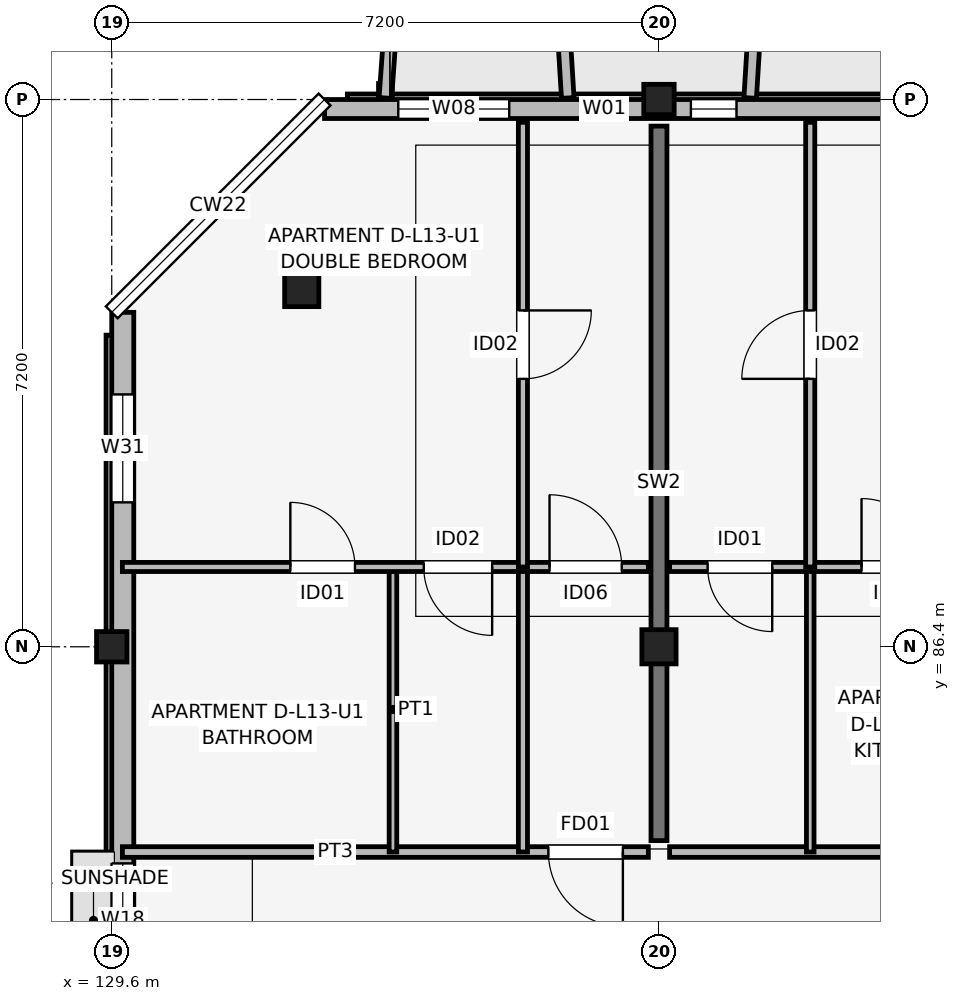
"""IFC4 building model, lengths in metres.
Left out: names, types, materials, properties, quantities, classifications, styles, units other than length and angle.
Written with IfcOpenShell. Run it as: python <this file> out.ifc"""

import sys

from ifc_helpers import new_model, si_unit, direction, frame, frame_2d, origin, origin_2d, place, context, subcontext, project, spatial, rectangle, extrude, element, fill, save


model = new_model("IFC4")
c1 = context("Model", 3, precision=1e-05, world=origin(), true_north=direction((0.0, 1.0)))
c2 = subcontext(c1, "Body", "Model", "MODEL_VIEW")
j1 = project(units=[si_unit("LENGTHUNIT", "METRE"), si_unit("PLANEANGLEUNIT", "RADIAN")], contexts=[c1])
p1 = place(None, origin())
s1 = spatial("IfcSite", under=j1, at=p1, CompositionType="ELEMENT")
p2 = place(p1, origin())
s2 = spatial("IfcBuilding", under=s1, at=p2, CompositionType="ELEMENT")
p3 = place(p2, frame((0.0, 0.0, 43.35)))
s3 = spatial("IfcBuildingStorey", under=s2, at=p3, CompositionType="ELEMENT", Elevation=43.35)
p4 = place(p3, frame((129.6, 86.4, 0.0), z_axis=(0.0, 0.0, 1.0), x_axis=(1.0, 0.0, 0.0)))
e1 = element("IfcColumn", 1, at=p4, inside=s3, PredefinedType="COLUMN", context=c2, shape_type="SweptSolid", body=[
    extrude(rectangle(XDim=0.4, YDim=0.4, at=origin_2d()), origin(), (0.0, 0.0, 1.0), 3.15),
])
for number, where, z_axis, x_axis in (
    (2, (132.1, 91.1, 0.0), (0.0, 0.0, 1.0), (1.0, 0.0, 0.0)),
    (3, (136.8, 86.4, 0.0), (0.0, 0.0, 1.0), (1.0, 0.0, 0.0)),
):
    element("IfcColumn", number, at=place(p3, frame(where, z_axis=z_axis, x_axis=x_axis)), inside=s3, PredefinedType="COLUMN", context=c2, shape_type="SweptSolid", body=[
        extrude(rectangle(XDim=0.45, YDim=0.45, at=origin_2d()), origin(), (0.0, 0.0, 1.0), 3.15),
    ])
p5 = place(p3, frame((136.8, 93.6, 0.0), z_axis=(0.0, 0.0, 1.0), x_axis=(1.0, 0.0, 0.0)))
e4 = element("IfcColumn", 4, at=p5, inside=s3, PredefinedType="COLUMN", context=c2, shape_type="SweptSolid", body=[
    extrude(rectangle(XDim=0.4, YDim=0.4, at=origin_2d()), origin(), (0.0, 0.0, 1.0), 3.15),
])
p6 = place(p3, frame((136.8, 83.85, 0.0), z_axis=(0.0, 0.0, 1.0), x_axis=(0.0, 1.0, 0.0)))
e5 = element("IfcWall", 5, at=p6, inside=s3, PredefinedType="SHEAR", context=c2, shape_type="SweptSolid", body=[
    extrude(rectangle(XDim=9.4, YDim=0.21, at=frame_2d((4.7, 0.0))), origin(), (0.0, 0.0, 1.0), 3.15),
])
p7 = place(p3, frame((162.8, 93.475, 0.0), z_axis=(0.0, 0.0, 1.0), x_axis=(-1.0, 0.0, 0.0)))
e6 = element("IfcWall", 6, at=p7, inside=s3, PredefinedType="SOLIDWALL", context=c2, shape_type="SweptSolid", body=[
    extrude(rectangle(XDim=30.4, YDim=0.25, at=frame_2d((15.2, 0.0))), origin(), (0.0, 0.0, 1.0), 2.45),
])
p8 = place(p7, frame((21.95, 0.0, 0.0), z_axis=(0.0, 0.0, 1.0), x_axis=(-1.0, 0.0, 0.0)))
e7 = element("IfcOpeningElement", 7, at=p8, cuts=e6, PredefinedType="OPENING", context=c2, shape_type="SweptSolid", body=[
    extrude(rectangle(XDim=1.5, YDim=2.15, at=frame_2d((0.75, 1.075))), frame((0.0, 0.135, 0.0), z_axis=(0.0, -1.0, 0.0), x_axis=(1.0, 0.0, 0.0)), (0.0, 0.0, 1.0), 0.27),
])
p9 = place(p7, frame((7.7, 0.0, 0.0), z_axis=(0.0, 0.0, 1.0), x_axis=(-1.0, 0.0, 0.0)))
e8 = element("IfcOpeningElement", 8, at=p9, cuts=e6, PredefinedType="OPENING", context=c2, shape_type="SweptSolid", body=[
    extrude(rectangle(XDim=1.8, YDim=2.15, at=frame_2d((0.9, 1.075))), frame((0.0, 0.135, 0.0), z_axis=(0.0, -1.0, 0.0), x_axis=(1.0, 0.0, 0.0)), (0.0, 0.0, 1.0), 0.27),
])
p10 = place(p7, frame((27.97, 0.0, 0.7)))
e9 = element("IfcOpeningElement", 9, at=p10, cuts=e6, PredefinedType="OPENING", context=c2, shape_type="SweptSolid", body=[
    extrude(rectangle(XDim=1.46, YDim=1.55, at=frame_2d((0.73, 0.775))), frame((0.0, 0.135, 0.0), z_axis=(0.0, -1.0, 0.0), x_axis=(1.0, 0.0, 0.0)), (0.0, 0.0, 1.0), 0.27),
])
p11 = place(p7, frame((26.42, 0.0, 0.75)))
e10 = element("IfcOpeningElement", 10, at=p11, cuts=e6, PredefinedType="OPENING", context=c2, shape_type="SweptSolid", body=[
    extrude(rectangle(XDim=0.6, YDim=1.25, at=frame_2d((0.3, 0.625))), frame((0.0, 0.135, 0.0), z_axis=(0.0, -1.0, 0.0), x_axis=(1.0, 0.0, 0.0)), (0.0, 0.0, 1.0), 0.27),
])
p12 = place(p7, frame((24.98, 0.0, 0.75)))
e11 = element("IfcOpeningElement", 11, at=p12, cuts=e6, PredefinedType="OPENING", context=c2, shape_type="SweptSolid", body=[
    extrude(rectangle(XDim=0.6, YDim=1.25, at=frame_2d((0.3, 0.625))), frame((0.0, 0.135, 0.0), z_axis=(0.0, -1.0, 0.0), x_axis=(1.0, 0.0, 0.0)), (0.0, 0.0, 1.0), 0.27),
])
p13 = place(p7, frame((16.725, 0.0, 0.75)))
e12 = element("IfcOpeningElement", 12, at=p13, cuts=e6, PredefinedType="OPENING", context=c2, shape_type="SweptSolid", body=[
    extrude(rectangle(XDim=0.72, YDim=1.35, at=frame_2d((0.36, 0.675))), frame((0.0, 0.135, 0.0), z_axis=(0.0, -1.0, 0.0), x_axis=(1.0, 0.0, 0.0)), (0.0, 0.0, 1.0), 0.27),
])
p14 = place(p7, frame((12.925, 0.0, 0.69)))
e13 = element("IfcOpeningElement", 13, at=p14, cuts=e6, PredefinedType="OPENING", context=c2, shape_type="SweptSolid", body=[
    extrude(rectangle(XDim=2.15, YDim=1.65, at=frame_2d((1.075, 0.825))), frame((0.0, 0.135, 0.0), z_axis=(0.0, -1.0, 0.0), x_axis=(1.0, 0.0, 0.0)), (0.0, 0.0, 1.0), 0.27),
])
p15 = place(p7, frame((9.525, 0.0, 0.75)))
e14 = element("IfcOpeningElement", 14, at=p15, cuts=e6, PredefinedType="OPENING", context=c2, shape_type="SweptSolid", body=[
    extrude(rectangle(XDim=0.72, YDim=1.35, at=frame_2d((0.36, 0.675))), frame((0.0, 0.135, 0.0), z_axis=(0.0, -1.0, 0.0), x_axis=(1.0, 0.0, 0.0)), (0.0, 0.0, 1.0), 0.27),
])
p16 = place(p7, frame((1.21, 0.0, 0.7)))
e15 = element("IfcOpeningElement", 15, at=p16, cuts=e6, PredefinedType="OPENING", context=c2, shape_type="SweptSolid", body=[
    extrude(rectangle(XDim=1.58, YDim=1.6, at=frame_2d((0.79, 0.8))), frame((0.0, 0.135, 0.0), z_axis=(0.0, -1.0, 0.0), x_axis=(1.0, 0.0, 0.0)), (0.0, 0.0, 1.0), 0.27),
])
p17 = place(p3, frame((129.745, 90.8, 0.0), z_axis=(0.0, 0.0, 1.0), x_axis=(0.0, -1.0, 0.0)))
e16 = element("IfcWall", 16, at=p17, inside=s3, PredefinedType="SOLIDWALL", context=c2, shape_type="SweptSolid", body=[
    extrude(rectangle(XDim=16.0, YDim=0.29, at=frame_2d((8.0, 0.0))), origin(), (0.0, 0.0, 1.0), 2.51),
])
p18 = place(p17, frame((7.25, 0.0, 1.05)))
e17 = element("IfcOpeningElement", 17, at=p18, cuts=e16, PredefinedType="OPENING", context=c2, shape_type="SweptSolid", body=[
    extrude(rectangle(XDim=1.5, YDim=1.15, at=frame_2d((0.75, 0.575))), frame((0.0, 0.155, 0.0), z_axis=(0.0, -1.0, 0.0), x_axis=(1.0, 0.0, 0.0)), (0.0, 0.0, 1.0), 0.31),
])
p19 = place(p17, frame((1.08, 0.0, 0.75)))
e18 = element("IfcOpeningElement", 18, at=p19, cuts=e16, PredefinedType="OPENING", context=c2, shape_type="SweptSolid", body=[
    extrude(rectangle(XDim=1.42, YDim=1.6, at=frame_2d((0.71, 0.8))), frame((0.0, 0.155, 0.0), z_axis=(0.0, -1.0, 0.0), x_axis=(1.0, 0.0, 0.0)), (0.0, 0.0, 1.0), 0.31),
])
p20 = place(p3, frame((133.2, 93.62, 0.0), z_axis=(0.0, 0.0, 1.0), x_axis=(0.071317687608, 0.997453651772, 0.0)))
e19 = element("IfcWall", 19, at=p20, inside=s3, PredefinedType="ELEMENTEDWALL", context=c2, shape_type="SweptSolid", body=[
    extrude(rectangle(XDim=1.965, YDim=0.165, at=frame_2d((0.982, 0.0))), origin(), (0.0, 0.0, 1.0), 2.8),
])
p21 = place(p3, frame((135.6, 93.62, 0.0), z_axis=(0.0, 0.0, 1.0), x_axis=(-0.061170732449, 0.998127317276, 0.0)))
e20 = element("IfcWall", 20, at=p21, inside=s3, PredefinedType="ELEMENTEDWALL", context=c2, shape_type="SweptSolid", body=[
    extrude(rectangle(XDim=1.964, YDim=0.165, at=frame_2d((0.982, 0.0))), origin(), (0.0, 0.0, 1.0), 2.8),
])
p22 = place(p3, frame((138.0, 93.62, 0.0), z_axis=(0.0, 0.0, 1.0), x_axis=(0.061170732449, 0.998127317276, 0.0)))
e21 = element("IfcWall", 21, at=p22, inside=s3, PredefinedType="ELEMENTEDWALL", context=c2, shape_type="SweptSolid", body=[
    extrude(rectangle(XDim=1.964, YDim=0.165, at=frame_2d((0.982, 0.0))), origin(), (0.0, 0.0, 1.0), 2.45),
])
p23 = place(p3, frame((129.74, 83.7, 0.0), z_axis=(0.0, 0.0, 1.0), x_axis=(1.0, 0.0, 0.0)))
e22 = element("IfcWall", 22, at=p23, inside=s3, PredefinedType="PARTITIONING", context=c2, shape_type="SweptSolid", body=[
    extrude(rectangle(XDim=6.92, YDim=0.14, at=frame_2d((3.46, 0.0))), origin(), (0.0, 0.0, 1.0), 2.38),
])
p24 = place(p23, frame((6.585, 0.0, 0.0), z_axis=(0.0, 0.0, 1.0), x_axis=(-1.0, 0.0, 0.0)))
e23 = element("IfcOpeningElement", 23, at=p24, cuts=e22, PredefinedType="OPENING", context=c2, shape_type="SweptSolid", body=[
    extrude(rectangle(XDim=0.98, YDim=2.1, at=frame_2d((0.49, 1.05))), frame((0.0, 0.08, 0.0), z_axis=(0.0, -1.0, 0.0), x_axis=(1.0, 0.0, 0.0)), (0.0, 0.0, 1.0), 0.16),
])
p25 = place(p3, frame((133.3, 83.7, 0.0), z_axis=(0.0, 0.0, 1.0), x_axis=(0.0, 1.0, 0.0)))
e24 = element("IfcWall", 24, at=p25, inside=s3, PredefinedType="PARTITIONING", context=c2, shape_type="SweptSolid", body=[
    extrude(rectangle(XDim=3.75, YDim=0.1, at=frame_2d((1.875, 0.0))), origin(), (0.0, 0.0, 1.0), 2.38),
])
p26 = place(p3, frame((135.01, 83.7, 0.0), z_axis=(0.0, 0.0, 1.0), x_axis=(0.0, 1.0, 0.0)))
e25 = element("IfcWall", 25, at=p26, inside=s3, PredefinedType="PARTITIONING", context=c2, shape_type="SweptSolid", body=[
    extrude(rectangle(XDim=3.75, YDim=0.12, at=frame_2d((1.875, 0.0))), origin(), (0.0, 0.0, 1.0), 2.38),
])
p27 = place(p3, frame((129.74, 87.45, 0.0), z_axis=(0.0, 0.0, 1.0), x_axis=(1.0, 0.0, 0.0)))
e26 = element("IfcWall", 26, at=p27, inside=s3, PredefinedType="PARTITIONING", context=c2, shape_type="SweptSolid", body=[
    extrude(rectangle(XDim=6.92, YDim=0.12, at=frame_2d((3.46, 0.0))), origin(), (0.0, 0.0, 1.0), 2.38),
])
p28 = place(p27, frame((2.21, 0.0, 0.0)))
e27 = element("IfcOpeningElement", 27, at=p28, cuts=e26, PredefinedType="OPENING", context=c2, shape_type="SweptSolid", body=[
    extrude(rectangle(XDim=0.85, YDim=2.08, at=frame_2d((0.425, 1.04))), frame((0.0, 0.07, 0.0), z_axis=(0.0, -1.0, 0.0), x_axis=(1.0, 0.0, 0.0)), (0.0, 0.0, 1.0), 0.14),
])
p29 = place(p27, frame((4.865, 0.0, 0.0), z_axis=(0.0, 0.0, 1.0), x_axis=(-1.0, 0.0, 0.0)))
e28 = element("IfcOpeningElement", 28, at=p29, cuts=e26, PredefinedType="OPENING", context=c2, shape_type="SweptSolid", body=[
    extrude(rectangle(XDim=0.9, YDim=2.08, at=frame_2d((0.45, 1.04))), frame((0.0, 0.07, 0.0), z_axis=(0.0, -1.0, 0.0), x_axis=(1.0, 0.0, 0.0)), (0.0, 0.0, 1.0), 0.14),
])
p30 = place(p27, frame((5.62, 0.0, 0.0)))
e29 = element("IfcOpeningElement", 29, at=p30, cuts=e26, PredefinedType="OPENING", context=c2, shape_type="SweptSolid", body=[
    extrude(rectangle(XDim=0.95, YDim=2.08, at=frame_2d((0.475, 1.04))), frame((0.0, 0.07, 0.0), z_axis=(0.0, -1.0, 0.0), x_axis=(1.0, 0.0, 0.0)), (0.0, 0.0, 1.0), 0.14),
])
p31 = place(p3, frame((135.01, 87.45, 0.0), z_axis=(0.0, 0.0, 1.0), x_axis=(0.0, 1.0, 0.0)))
e30 = element("IfcWall", 30, at=p31, inside=s3, PredefinedType="PARTITIONING", context=c2, shape_type="SweptSolid", body=[
    extrude(rectangle(XDim=5.85, YDim=0.12, at=frame_2d((2.925, 0.0))), origin(), (0.0, 0.0, 1.0), 2.38),
])
p32 = place(p31, frame((3.375, 0.0, 0.0), z_axis=(0.0, 0.0, 1.0), x_axis=(-1.0, 0.0, 0.0)))
e31 = element("IfcOpeningElement", 31, at=p32, cuts=e30, PredefinedType="OPENING", context=c2, shape_type="SweptSolid", body=[
    extrude(rectangle(XDim=0.9, YDim=2.08, at=frame_2d((0.45, 1.04))), frame((0.0, 0.07, 0.0), z_axis=(0.0, -1.0, 0.0), x_axis=(1.0, 0.0, 0.0)), (0.0, 0.0, 1.0), 0.14),
])
p33 = place(p3, frame((136.94, 83.7, 0.0), z_axis=(0.0, 0.0, 1.0), x_axis=(1.0, 0.0, 0.0)))
e32 = element("IfcWall", 32, at=p33, inside=s3, PredefinedType="PARTITIONING", context=c2, shape_type="SweptSolid", body=[
    extrude(rectangle(XDim=6.92, YDim=0.14, at=frame_2d((3.46, 0.0))), origin(), (0.0, 0.0, 1.0), 2.38),
])
p34 = place(p33, frame((5.02, 0.0, 0.0)))
e33 = element("IfcOpeningElement", 33, at=p34, cuts=e32, PredefinedType="OPENING", context=c2, shape_type="SweptSolid", body=[
    extrude(rectangle(XDim=0.98, YDim=2.1, at=frame_2d((0.49, 1.05))), frame((0.0, 0.08, 0.0), z_axis=(0.0, -1.0, 0.0), x_axis=(1.0, 0.0, 0.0)), (0.0, 0.0, 1.0), 0.16),
])
p35 = place(p3, frame((138.79, 83.7, 0.0), z_axis=(0.0, 0.0, 1.0), x_axis=(0.0, 1.0, 0.0)))
e34 = element("IfcWall", 34, at=p35, inside=s3, PredefinedType="PARTITIONING", context=c2, shape_type="SweptSolid", body=[
    extrude(rectangle(XDim=3.75, YDim=0.1, at=frame_2d((1.875, 0.0))), origin(), (0.0, 0.0, 1.0), 2.38),
])
p36 = place(p3, frame((136.94, 87.45, 0.0), z_axis=(0.0, 0.0, 1.0), x_axis=(1.0, 0.0, 0.0)))
e35 = element("IfcWall", 35, at=p36, inside=s3, PredefinedType="PARTITIONING", context=c2, shape_type="SweptSolid", body=[
    extrude(rectangle(XDim=6.92, YDim=0.12, at=frame_2d((3.46, 0.0))), origin(), (0.0, 0.0, 1.0), 2.38),
])
p37 = place(p36, frame((1.35, 0.0, 0.0), z_axis=(0.0, 0.0, 1.0), x_axis=(-1.0, 0.0, 0.0)))
e36 = element("IfcOpeningElement", 36, at=p37, cuts=e35, PredefinedType="OPENING", context=c2, shape_type="SweptSolid", body=[
    extrude(rectangle(XDim=0.85, YDim=2.08, at=frame_2d((0.425, 1.04))), frame((0.0, 0.07, 0.0), z_axis=(0.0, -1.0, 0.0), x_axis=(1.0, 0.0, 0.0)), (0.0, 0.0, 1.0), 0.14),
])
p38 = place(p36, frame((2.525, 0.0, 0.0)))
e37 = element("IfcOpeningElement", 37, at=p38, cuts=e35, PredefinedType="OPENING", context=c2, shape_type="SweptSolid", body=[
    extrude(rectangle(XDim=0.9, YDim=2.08, at=frame_2d((0.45, 1.04))), frame((0.0, 0.07, 0.0), z_axis=(0.0, -1.0, 0.0), x_axis=(1.0, 0.0, 0.0)), (0.0, 0.0, 1.0), 0.14),
])
p39 = place(p36, frame((5.985, 0.0, 0.0), z_axis=(0.0, 0.0, 1.0), x_axis=(-1.0, 0.0, 0.0)))
e38 = element("IfcOpeningElement", 38, at=p39, cuts=e35, PredefinedType="OPENING", context=c2, shape_type="SweptSolid", body=[
    extrude(rectangle(XDim=0.95, YDim=2.08, at=frame_2d((0.475, 1.04))), frame((0.0, 0.07, 0.0), z_axis=(0.0, -1.0, 0.0), x_axis=(1.0, 0.0, 0.0)), (0.0, 0.0, 1.0), 0.14),
])
p40 = place(p3, frame((138.79, 87.45, 0.0), z_axis=(0.0, 0.0, 1.0), x_axis=(0.0, 1.0, 0.0)))
e39 = element("IfcWall", 39, at=p40, inside=s3, PredefinedType="PARTITIONING", context=c2, shape_type="SweptSolid", body=[
    extrude(rectangle(XDim=5.85, YDim=0.12, at=frame_2d((2.925, 0.0))), origin(), (0.0, 0.0, 1.0), 2.38),
])
p41 = place(p40, frame((2.475, 0.0, 0.0)))
e40 = element("IfcOpeningElement", 40, at=p41, cuts=e39, PredefinedType="OPENING", context=c2, shape_type="SweptSolid", body=[
    extrude(rectangle(XDim=0.9, YDim=2.08, at=frame_2d((0.45, 1.04))), frame((0.0, 0.07, 0.0), z_axis=(0.0, -1.0, 0.0), x_axis=(1.0, 0.0, 0.0)), (0.0, 0.0, 1.0), 0.14),
])
p42 = place(p10, origin())
e41 = element("IfcWindow", 41, at=p42, inside=s3, PartitioningType="SINGLE_PANEL", PredefinedType="WINDOW", context=c2, shape_type="SweptSolid", body=[
    extrude(rectangle(XDim=1.46, YDim=1.55, at=frame_2d((0.73, 0.775))), frame((0.0, 0.03, 0.0), z_axis=(0.0, -1.0, 0.0), x_axis=(1.0, 0.0, 0.0)), (0.0, 0.0, 1.0), 0.06),
])
fill(e9, e41)
p43 = place(p11, origin())
e42 = element("IfcWindow", 42, at=p43, inside=s3, PartitioningType="SINGLE_PANEL", PredefinedType="WINDOW", context=c2, shape_type="SweptSolid", body=[
    extrude(rectangle(XDim=0.6, YDim=1.25, at=frame_2d((0.3, 0.625))), frame((0.0, 0.03, 0.0), z_axis=(0.0, -1.0, 0.0), x_axis=(1.0, 0.0, 0.0)), (0.0, 0.0, 1.0), 0.06),
])
fill(e10, e42)
p44 = place(p12, origin())
e43 = element("IfcWindow", 43, at=p44, inside=s3, PartitioningType="SINGLE_PANEL", PredefinedType="WINDOW", context=c2, shape_type="SweptSolid", body=[
    extrude(rectangle(XDim=0.6, YDim=1.25, at=frame_2d((0.3, 0.625))), frame((0.0, 0.03, 0.0), z_axis=(0.0, -1.0, 0.0), x_axis=(1.0, 0.0, 0.0)), (0.0, 0.0, 1.0), 0.06),
])
fill(e11, e43)
p45 = place(p18, origin())
e44 = element("IfcWindow", 44, at=p45, inside=s3, PartitioningType="SINGLE_PANEL", PredefinedType="WINDOW", context=c2, shape_type="SweptSolid", body=[
    extrude(rectangle(XDim=1.5, YDim=1.15, at=frame_2d((0.75, 0.575))), frame((0.0, 0.03, 0.0), z_axis=(0.0, -1.0, 0.0), x_axis=(1.0, 0.0, 0.0)), (0.0, 0.0, 1.0), 0.06),
])
fill(e17, e44)
p46 = place(p19, origin())
e45 = element("IfcWindow", 45, at=p46, inside=s3, PartitioningType="SINGLE_PANEL", PredefinedType="WINDOW", context=c2, shape_type="SweptSolid", body=[
    extrude(rectangle(XDim=1.42, YDim=1.6, at=frame_2d((0.71, 0.8))), frame((0.0, 0.03, 0.0), z_axis=(0.0, -1.0, 0.0), x_axis=(1.0, 0.0, 0.0)), (0.0, 0.0, 1.0), 0.06),
])
fill(e18, e45)
p47 = place(p24, origin())
e46 = element("IfcDoor", 46, at=p47, inside=s3, OperationType="SINGLE_SWING_RIGHT", PredefinedType="DOOR", context=c2, shape_type="SweptSolid", body=[
    extrude(rectangle(XDim=0.98, YDim=2.1, at=frame_2d((0.49, 1.05))), frame((0.0, 0.025, 0.0), z_axis=(0.0, -1.0, 0.0), x_axis=(1.0, 0.0, 0.0)), (0.0, 0.0, 1.0), 0.05),
])
fill(e23, e46)
p48 = place(p28, origin())
e47 = element("IfcDoor", 47, at=p48, inside=s3, OperationType="SINGLE_SWING_LEFT", PredefinedType="DOOR", context=c2, shape_type="SweptSolid", body=[
    extrude(rectangle(XDim=0.85, YDim=2.08, at=frame_2d((0.425, 1.04))), frame((0.0, 0.025, 0.0), z_axis=(0.0, -1.0, 0.0), x_axis=(1.0, 0.0, 0.0)), (0.0, 0.0, 1.0), 0.05),
])
fill(e27, e47)
p49 = place(p29, origin())
e48 = element("IfcDoor", 48, at=p49, inside=s3, OperationType="SINGLE_SWING_RIGHT", PredefinedType="DOOR", context=c2, shape_type="SweptSolid", body=[
    extrude(rectangle(XDim=0.9, YDim=2.08, at=frame_2d((0.45, 1.04))), frame((0.0, 0.025, 0.0), z_axis=(0.0, -1.0, 0.0), x_axis=(1.0, 0.0, 0.0)), (0.0, 0.0, 1.0), 0.05),
])
fill(e28, e48)
p50 = place(p30, origin())
e49 = element("IfcDoor", 49, at=p50, inside=s3, OperationType="SINGLE_SWING_LEFT", PredefinedType="DOOR", context=c2, shape_type="SweptSolid", body=[
    extrude(rectangle(XDim=0.95, YDim=2.08, at=frame_2d((0.475, 1.04))), frame((0.0, 0.025, 0.0), z_axis=(0.0, -1.0, 0.0), x_axis=(1.0, 0.0, 0.0)), (0.0, 0.0, 1.0), 0.05),
])
fill(e29, e49)
p51 = place(p32, origin())
e50 = element("IfcDoor", 50, at=p51, inside=s3, OperationType="SINGLE_SWING_RIGHT", PredefinedType="DOOR", context=c2, shape_type="SweptSolid", body=[
    extrude(rectangle(XDim=0.9, YDim=2.08, at=frame_2d((0.45, 1.04))), frame((0.0, 0.025, 0.0), z_axis=(0.0, -1.0, 0.0), x_axis=(1.0, 0.0, 0.0)), (0.0, 0.0, 1.0), 0.05),
])
fill(e31, e50)
p52 = place(p37, origin())
e51 = element("IfcDoor", 51, at=p52, inside=s3, OperationType="SINGLE_SWING_RIGHT", PredefinedType="DOOR", context=c2, shape_type="SweptSolid", body=[
    extrude(rectangle(XDim=0.85, YDim=2.08, at=frame_2d((0.425, 1.04))), frame((0.0, 0.025, 0.0), z_axis=(0.0, -1.0, 0.0), x_axis=(1.0, 0.0, 0.0)), (0.0, 0.0, 1.0), 0.05),
])
fill(e36, e51)
p53 = place(p38, origin())
e52 = element("IfcDoor", 52, at=p53, inside=s3, OperationType="SINGLE_SWING_LEFT", PredefinedType="DOOR", context=c2, shape_type="SweptSolid", body=[
    extrude(rectangle(XDim=0.9, YDim=2.08, at=frame_2d((0.45, 1.04))), frame((0.0, 0.025, 0.0), z_axis=(0.0, -1.0, 0.0), x_axis=(1.0, 0.0, 0.0)), (0.0, 0.0, 1.0), 0.05),
])
fill(e37, e52)
p54 = place(p41, origin())
e53 = element("IfcDoor", 53, at=p54, inside=s3, OperationType="SINGLE_SWING_LEFT", PredefinedType="DOOR", context=c2, shape_type="SweptSolid", body=[
    extrude(rectangle(XDim=0.9, YDim=2.08, at=frame_2d((0.45, 1.04))), frame((0.0, 0.025, 0.0), z_axis=(0.0, -1.0, 0.0), x_axis=(1.0, 0.0, 0.0)), (0.0, 0.0, 1.0), 0.05),
])
fill(e40, e53)
save(model, sys.argv[1])
